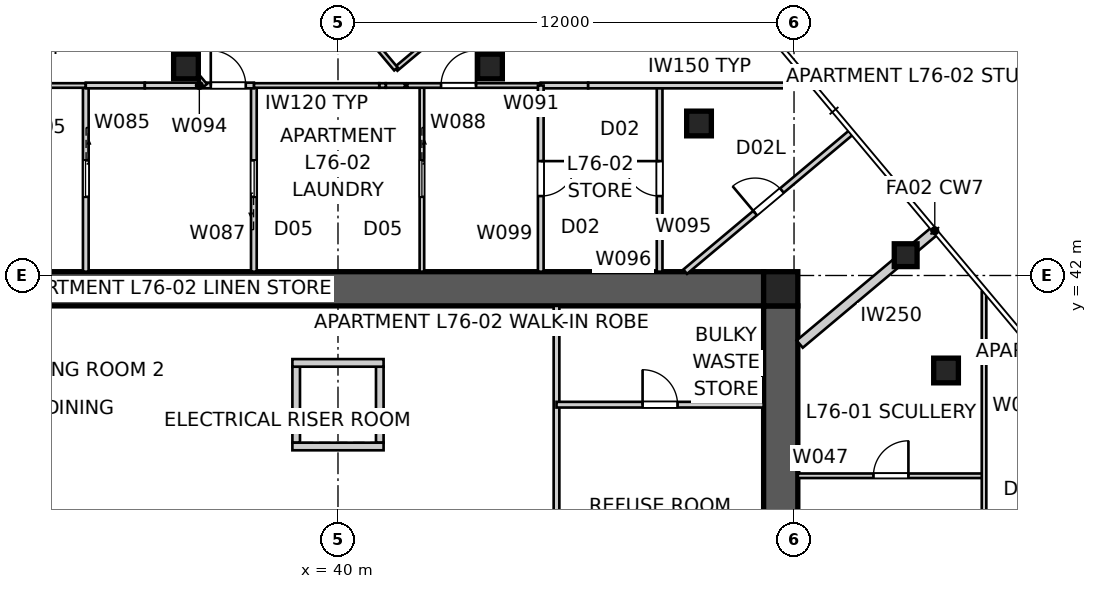
"""IFC4 building model, lengths in metres.
Left out: names, types, materials, properties, quantities, classifications, styles, units other than length and angle.
Written with IfcOpenShell. Run it as: python <this file> out.ifc"""

import sys

from ifc_helpers import new_model, si_unit, direction, frame, frame_2d, origin, origin_2d, place, context, subcontext, project, spatial, polyline, rectangle, outline, extrude, element, fill, save


model = new_model("IFC4")
c1 = context("Model", 3, precision=1e-05, world=origin(), true_north=direction((0.0, 1.0)))
c2 = subcontext(c1, "Body", "Model", "MODEL_VIEW")
j1 = project(units=[si_unit("LENGTHUNIT", "METRE"), si_unit("PLANEANGLEUNIT", "RADIAN")], contexts=[c1])
p1 = place(None, origin())
s1 = spatial("IfcSite", under=j1, at=p1, CompositionType="ELEMENT")
p2 = place(p1, origin())
s2 = spatial("IfcBuilding", under=s1, at=p2, CompositionType="ELEMENT")
p3 = place(p2, frame((0.0, 0.0, 276.0)))
s3 = spatial("IfcBuildingStorey", under=s2, at=p3, CompositionType="ELEMENT", Elevation=276.0)
p4 = place(p3, frame((28.8, 41.65, 0.0), z_axis=(0.0, 0.0, 1.0), x_axis=(1.0, 0.0, 0.0)))
e1 = element("IfcWall", 1, at=p4, inside=s3, PredefinedType="SHEAR", context=c2, shape_type="SweptSolid", body=[
    extrude(outline(polyline([(0.0, -0.45), (22.4, -0.45), (22.4, -0.025), (22.85, -0.025), (22.85, 0.025), (22.4, 0.025), (22.4, 0.45), (0.0, 0.45), (0.0, 0.025), (-0.45, 0.025), (-0.45, -0.025), (0.0, -0.025), (0.0, -0.45)])), origin(), (0.0, 0.0, 1.0), 3.4),
])
p5 = place(p3, frame((51.65, 18.8, 0.0), z_axis=(0.0, 0.0, 1.0), x_axis=(0.0, 1.0, 0.0)))
e2 = element("IfcWall", 2, at=p5, inside=s3, PredefinedType="SHEAR", context=c2, shape_type="SweptSolid", body=[
    extrude(outline(polyline([(0.0, -0.45), (22.4, -0.45), (22.4, -0.025), (22.85, -0.025), (22.85, 0.025), (22.4, 0.025), (22.4, 0.45), (0.0, 0.45), (0.0, 0.025), (-0.45, 0.025), (-0.45, -0.025), (0.0, -0.025), (0.0, -0.45)])), origin(), (0.0, 0.0, 1.0), 3.4),
])
p6 = place(p5, frame((11.14, 0.0, 0.0)))
e3 = element("IfcOpeningElement", 3, at=p6, cuts=e2, PredefinedType="OPENING", context=c2, shape_type="SweptSolid", body=[
    extrude(rectangle(XDim=1.02, YDim=2.4, at=frame_2d((0.51, 1.2))), frame((0.0, 0.46, 0.0), z_axis=(0.0, -1.0, 0.0), x_axis=(1.0, 0.0, 0.0)), (0.0, 0.0, 1.0), 0.92),
])
for number, where, z_axis, x_axis in (
    (4, (38.9, 37.6, 0.0), (0.0, 0.0, 1.0), (0.0, 1.0, 0.0)),
    (5, (41.1, 37.6, 0.0), (0.0, 0.0, 1.0), (0.0, 1.0, 0.0)),
):
    element("IfcWall", number, at=place(p3, frame(where, z_axis=z_axis, x_axis=x_axis)), inside=s3, PredefinedType="SOLIDWALL", context=c2, shape_type="SweptSolid", body=[
        extrude(rectangle(XDim=2.0, YDim=0.2, at=frame_2d((1.0, 0.0))), origin(), (0.0, 0.0, 1.0), 3.4),
    ])
for number, where, z_axis, x_axis in (
    (6, (38.8, 37.5, 0.0), (0.0, 0.0, 1.0), (1.0, 0.0, 0.0)),
    (7, (38.8, 39.7, 0.0), (0.0, 0.0, 1.0), (1.0, 0.0, 0.0)),
):
    element("IfcWall", number, at=place(p3, frame(where, z_axis=z_axis, x_axis=x_axis)), inside=s3, PredefinedType="SOLIDWALL", context=c2, shape_type="SweptSolid", body=[
        extrude(rectangle(XDim=2.4, YDim=0.2, at=frame_2d((1.2, 0.0))), origin(), (0.0, 0.0, 1.0), 3.4),
    ])
p7 = place(p3, frame((51.65, 41.65, 0.0), z_axis=(0.0, 0.0, 1.0), x_axis=(1.0, 0.0, 0.0)))
e8 = element("IfcColumn", 8, at=p7, inside=s3, PredefinedType="COLUMN", context=c2, shape_type="SweptSolid", body=[
    extrude(rectangle(XDim=0.9, YDim=0.9, at=origin_2d()), origin(), (0.0, 0.0, 1.0), 3.4),
])
p8 = place(p3, frame((54.938, 42.534, 0.0), z_axis=(0.0, 0.0, 1.0), x_axis=(1.0, 0.0, 0.0)))
e9 = element("IfcColumn", 9, at=p8, inside=s3, PredefinedType="COLUMN", context=c2, shape_type="SweptSolid", body=[
    extrude(rectangle(XDim=0.6, YDim=0.6, at=origin_2d()), origin(), (0.0, 0.0, 1.0), 3.4),
])
for number, where, z_axis, x_axis in (
    (10, (56.0, 39.5, 0.0), (0.0, 0.0, 1.0), (1.0, 0.0, 0.0)),
    (11, (49.5, 46.0, 0.0), (0.0, 0.0, 1.0), (1.0, 0.0, 0.0)),
    (12, (44.0, 47.5, 0.0), (0.0, 0.0, 1.0), (1.0, 0.0, 0.0)),
    (13, (36.0, 47.5, 0.0), (0.0, 0.0, 1.0), (1.0, 0.0, 0.0)),
):
    element("IfcColumn", number, at=place(p3, frame(where, z_axis=z_axis, x_axis=x_axis)), inside=s3, PredefinedType="COLUMN", context=c2, shape_type="SweptSolid", body=[
        extrude(rectangle(XDim=0.65, YDim=0.65, at=origin_2d()), origin(), (0.0, 0.0, 1.0), 3.4),
    ])
p9 = place(p3, frame((55.704, 43.177, 0.0), z_axis=(0.0, 0.0, 1.0), x_axis=(-0.76603440109, -0.64279957712, 0.0)))
e14 = element("IfcWall", 14, at=p9, inside=s3, PredefinedType="PARTITIONING", context=c2, shape_type="SweptSolid", body=[
    extrude(rectangle(XDim=4.64, YDim=0.25, at=frame_2d((2.32, 0.0))), origin(), (0.0, 0.0, 1.0), 3.25),
])
p10 = place(p3, frame((45.75, 41.2, 0.0), z_axis=(0.0, 0.0, 1.0), x_axis=(0.0, -1.0, 0.0)))
e15 = element("IfcWall", 15, at=p10, inside=s3, PredefinedType="SOLIDWALL", context=c2, shape_type="SweptSolid", body=[
    extrude(rectangle(XDim=5.9, YDim=0.15, at=frame_2d((2.95, 0.0))), origin(), (0.0, 0.0, 1.0), 3.25),
])
p11 = place(p3, frame((45.75, 38.6, 0.0), z_axis=(0.0, 0.0, 1.0), x_axis=(1.0, 0.0, 0.0)))
e16 = element("IfcWall", 16, at=p11, inside=s3, PredefinedType="SOLIDWALL", context=c2, shape_type="SweptSolid", body=[
    extrude(rectangle(XDim=5.45, YDim=0.15, at=frame_2d((2.725, 0.0))), origin(), (0.0, 0.0, 1.0), 3.25),
])
p12 = place(p11, frame((2.265, 0.0, 0.0)))
e17 = element("IfcOpeningElement", 17, at=p12, cuts=e16, PredefinedType="OPENING", context=c2, shape_type="SweptSolid", body=[
    extrude(rectangle(XDim=0.92, YDim=2.1, at=frame_2d((0.46, 1.05))), frame((0.0, 0.085, 0.0), z_axis=(0.0, -1.0, 0.0), x_axis=(1.0, 0.0, 0.0)), (0.0, 0.0, 1.0), 0.17),
])
p13 = place(p3, frame((52.1, 36.73, 0.0), z_axis=(0.0, 0.0, 1.0), x_axis=(1.0, 0.0, 0.0)))
e18 = element("IfcWall", 18, at=p13, inside=s3, PredefinedType="PARTITIONING", context=c2, shape_type="SweptSolid", body=[
    extrude(rectangle(XDim=4.9, YDim=0.12, at=frame_2d((2.45, 0.0))), origin(), (0.0, 0.0, 1.0), 3.25),
])
p14 = place(p13, frame((1.99, 0.0, 0.0)))
e19 = element("IfcOpeningElement", 19, at=p14, cuts=e18, PredefinedType="OPENING", context=c2, shape_type="SweptSolid", body=[
    extrude(rectangle(XDim=0.92, YDim=2.34, at=frame_2d((0.46, 1.17))), frame((0.0, 0.07, 0.0), z_axis=(0.0, -1.0, 0.0), x_axis=(1.0, 0.0, 0.0)), (0.0, 0.0, 1.0), 0.14),
])
p15 = place(p3, frame((57.0, 41.57, 0.0), z_axis=(0.0, 0.0, 1.0), x_axis=(0.0, -1.0, 0.0)))
e20 = element("IfcWall", 20, at=p15, inside=s3, PredefinedType="PARTITIONING", context=c2, shape_type="SweptSolid", body=[
    extrude(rectangle(XDim=12.656, YDim=0.12, at=frame_2d((6.328, 0.0))), origin(), (0.0, 0.0, 1.0), 2.549),
])
p16 = place(p15, frame((9.449, 0.0, 0.0)))
e21 = element("IfcOpeningElement", 21, at=p16, cuts=e20, PredefinedType="OPENING", context=c2, shape_type="SweptSolid", body=[
    extrude(rectangle(XDim=0.92, YDim=2.34, at=frame_2d((0.46, 1.17))), frame((0.0, 0.07, 0.0), z_axis=(0.0, -1.0, 0.0), x_axis=(1.0, 0.0, 0.0)), (0.0, 0.0, 1.0), 0.14),
])
p17 = place(p15, frame((6.031, 0.0, 0.0)))
e22 = element("IfcOpeningElement", 22, at=p17, cuts=e20, PredefinedType="OPENING", context=c2, shape_type="SweptSolid", body=[
    extrude(rectangle(XDim=0.92, YDim=2.34, at=frame_2d((0.46, 1.17))), frame((0.0, 0.07, 0.0), z_axis=(0.0, -1.0, 0.0), x_axis=(1.0, 0.0, 0.0)), (0.0, 0.0, 1.0), 0.14),
])
p18 = place(p3, frame((57.0, 33.495, 0.0), z_axis=(0.0, 0.0, 1.0), x_axis=(0.76605407051, 0.642776136034, 0.0)))
e23 = element("IfcWall", 23, at=p18, inside=s3, PredefinedType="PARTITIONING", context=c2, shape_type="SweptSolid", body=[
    extrude(rectangle(XDim=5.191, YDim=0.12, at=frame_2d((2.595, 0.0))), origin(), (0.0, 0.0, 1.0), 3.25),
])
p19 = place(p3, frame((33.364, 47.0, 0.0), z_axis=(0.0, 0.0, 1.0), x_axis=(0.0, -1.0, 0.0)))
e24 = element("IfcWall", 24, at=p19, inside=s3, PredefinedType="SOLIDWALL", context=c2, shape_type="SweptSolid", body=[
    extrude(rectangle(XDim=4.9, YDim=0.15, at=frame_2d((2.45, 0.0))), origin(), (0.0, 0.0, 1.0), 3.25),
])
p20 = place(p19, frame((1.97, 0.0, 0.0)))
e25 = element("IfcOpeningElement", 25, at=p20, cuts=e24, PredefinedType="OPENING", context=c2, shape_type="SweptSolid", body=[
    extrude(rectangle(XDim=0.96, YDim=2.1, at=frame_2d((0.48, 1.05))), frame((0.0, 0.085, 0.0), z_axis=(0.0, -1.0, 0.0), x_axis=(1.0, 0.0, 0.0)), (0.0, 0.0, 1.0), 0.17),
])
p21 = place(p3, frame((28.43, 47.0, 0.0), z_axis=(0.0, 0.0, 1.0), x_axis=(1.0, 0.0, 0.0)))
e26 = element("IfcWall", 26, at=p21, inside=s3, PredefinedType="PARTITIONING", context=c2, shape_type="SweptSolid", body=[
    extrude(rectangle(XDim=4.934, YDim=0.12, at=frame_2d((2.467, 0.0))), origin(), (0.0, 0.0, 1.0), 3.25),
])
p22 = place(p21, frame((2.553, 0.0, 0.0)))
e27 = element("IfcOpeningElement", 27, at=p22, cuts=e26, PredefinedType="OPENING", context=c2, shape_type="SweptSolid", body=[
    extrude(rectangle(XDim=0.96, YDim=2.1, at=frame_2d((0.48, 1.05))), frame((0.0, 0.07, 0.0), z_axis=(0.0, -1.0, 0.0), x_axis=(1.0, 0.0, 0.0)), (0.0, 0.0, 1.0), 0.14),
])
p23 = place(p3, frame((37.786, 42.1, 0.0), z_axis=(0.0, 0.0, 1.0), x_axis=(0.0, 1.0, 0.0)))
e28 = element("IfcWall", 28, at=p23, inside=s3, PredefinedType="SOLIDWALL", context=c2, shape_type="SweptSolid", body=[
    extrude(rectangle(XDim=4.9, YDim=0.15, at=frame_2d((2.45, 0.0))), origin(), (0.0, 0.0, 1.0), 3.25),
])
p24 = place(p23, frame((1.97, 0.0, 0.0)))
e29 = element("IfcOpeningElement", 29, at=p24, cuts=e28, PredefinedType="OPENING", context=c2, shape_type="SweptSolid", body=[
    extrude(rectangle(XDim=0.96, YDim=2.1, at=frame_2d((0.48, 1.05))), frame((0.0, 0.085, 0.0), z_axis=(0.0, -1.0, 0.0), x_axis=(1.0, 0.0, 0.0)), (0.0, 0.0, 1.0), 0.17),
])
p25 = place(p3, frame((42.208, 47.0, 0.0), z_axis=(0.0, 0.0, 1.0), x_axis=(0.0, -1.0, 0.0)))
e30 = element("IfcWall", 30, at=p25, inside=s3, PredefinedType="PARTITIONING", context=c2, shape_type="SweptSolid", body=[
    extrude(rectangle(XDim=4.9, YDim=0.12, at=frame_2d((2.45, 0.0))), origin(), (0.0, 0.0, 1.0), 3.25),
])
p26 = place(p25, frame((1.97, 0.0, 0.0)))
e31 = element("IfcOpeningElement", 31, at=p26, cuts=e30, PredefinedType="OPENING", context=c2, shape_type="SweptSolid", body=[
    extrude(rectangle(XDim=0.96, YDim=2.1, at=frame_2d((0.48, 1.05))), frame((0.0, 0.07, 0.0), z_axis=(0.0, -1.0, 0.0), x_axis=(1.0, 0.0, 0.0)), (0.0, 0.0, 1.0), 0.14),
])
p27 = place(p3, frame((41.258, 47.0, 0.0), z_axis=(0.0, 0.0, 1.0), x_axis=(1.0, 0.0, 0.0)))
e32 = element("IfcWall", 32, at=p27, inside=s3, PredefinedType="PARTITIONING", context=c2, shape_type="SweptSolid", body=[
    extrude(rectangle(XDim=0.504, YDim=0.12, at=frame_2d((0.252, 0.0))), origin(), (0.0, 0.0, 1.0), 3.25),
])
p28 = place(p3, frame((41.824, 47.0, 0.0), z_axis=(0.0, 0.0, 1.0), x_axis=(1.0, 0.0, 0.0)))
e33 = element("IfcWall", 33, at=p28, inside=s3, PredefinedType="PARTITIONING", context=c2, shape_type="SweptSolid", body=[
    extrude(rectangle(XDim=3.511, YDim=0.12, at=frame_2d((1.756, 0.0))), origin(), (0.0, 0.0, 1.0), 3.25),
])
p29 = place(p28, frame((0.887, 0.0, 0.0)))
e34 = element("IfcOpeningElement", 34, at=p29, cuts=e33, PredefinedType="OPENING", context=c2, shape_type="SweptSolid", body=[
    extrude(rectangle(XDim=0.92, YDim=2.34, at=frame_2d((0.46, 1.17))), frame((0.0, 0.07, 0.0), z_axis=(0.0, -1.0, 0.0), x_axis=(1.0, 0.0, 0.0)), (0.0, 0.0, 1.0), 0.14),
])
p30 = place(p3, frame((37.786, 47.0, 0.0), z_axis=(0.0, 0.0, 1.0), x_axis=(1.0, 0.0, 0.0)))
e35 = element("IfcWall", 35, at=p30, inside=s3, PredefinedType="PARTITIONING", context=c2, shape_type="SweptSolid", body=[
    extrude(rectangle(XDim=3.299, YDim=0.12, at=frame_2d((1.65, 0.0))), origin(), (0.0, 0.0, 1.0), 3.25),
])
p31 = place(p3, frame((33.364, 47.0, 0.0), z_axis=(0.0, 0.0, 1.0), x_axis=(1.0, 0.0, 0.0)))
e36 = element("IfcWall", 36, at=p31, inside=s3, PredefinedType="SOLIDWALL", context=c2, shape_type="SweptSolid", body=[
    extrude(rectangle(XDim=1.553, YDim=0.15, at=frame_2d((0.776, 0.0))), origin(), (0.0, 0.0, 1.0), 2.549),
])
p32 = place(p3, frame((34.917, 47.0, 0.0), z_axis=(0.0, 0.0, 1.0), x_axis=(1.0, 0.0, 0.0)))
e37 = element("IfcWall", 37, at=p32, inside=s3, PredefinedType="SOLIDWALL", context=c2, shape_type="SweptSolid", body=[
    extrude(rectangle(XDim=2.869, YDim=0.15, at=frame_2d((1.435, 0.0))), origin(), (0.0, 0.0, 1.0), 3.25),
])
p33 = place(p32, frame((1.736, 0.0, 0.0)))
e38 = element("IfcOpeningElement", 38, at=p33, cuts=e37, PredefinedType="OPENING", context=c2, shape_type="SweptSolid", body=[
    extrude(rectangle(XDim=0.92, YDim=2.34, at=frame_2d((0.46, 1.17))), frame((0.0, 0.085, 0.0), z_axis=(0.0, -1.0, 0.0), x_axis=(1.0, 0.0, 0.0)), (0.0, 0.0, 1.0), 0.17),
])
p34 = place(p3, frame((49.136, 42.1, 0.0), z_axis=(0.0, 0.0, 1.0), x_axis=(0.766055078255, 0.642774935012, 0.0)))
e39 = element("IfcWall", 39, at=p34, inside=s3, PredefinedType="SOLIDWALL", context=c2, shape_type="SweptSolid", body=[
    extrude(rectangle(XDim=5.684, YDim=0.15, at=frame_2d((2.842, 0.0))), origin(), (0.0, 0.0, 1.0), 3.25),
])
p35 = place(p34, frame((2.402, 0.0, 0.0)))
e40 = element("IfcOpeningElement", 40, at=p35, cuts=e39, PredefinedType="OPENING", context=c2, shape_type="SweptSolid", body=[
    extrude(rectangle(XDim=0.92, YDim=2.1, at=frame_2d((0.46, 1.05))), frame((0.0, 0.085, 0.0), z_axis=(0.0, -1.0, 0.0), x_axis=(1.0, 0.0, 0.0)), (0.0, 0.0, 1.0), 0.17),
])
p36 = place(p3, frame((48.463, 42.1, 0.0), z_axis=(0.0, 0.0, 1.0), x_axis=(0.0, 1.0, 0.0)))
e41 = element("IfcWall", 41, at=p36, inside=s3, PredefinedType="SOLIDWALL", context=c2, shape_type="SweptSolid", body=[
    extrude(rectangle(XDim=4.9, YDim=0.15, at=frame_2d((2.45, 0.0))), origin(), (0.0, 0.0, 1.0), 3.25),
])
p37 = place(p36, frame((1.99, 0.0, 0.0)))
e42 = element("IfcOpeningElement", 42, at=p37, cuts=e41, PredefinedType="OPENING", context=c2, shape_type="SweptSolid", body=[
    extrude(rectangle(XDim=0.92, YDim=2.34, at=frame_2d((0.46, 1.17))), frame((0.0, 0.085, 0.0), z_axis=(0.0, -1.0, 0.0), x_axis=(1.0, 0.0, 0.0)), (0.0, 0.0, 1.0), 0.17),
])
p38 = place(p3, frame((45.336, 47.0, 0.0), z_axis=(0.0, 0.0, 1.0), x_axis=(1.0, 0.0, 0.0)))
e43 = element("IfcWall", 43, at=p38, inside=s3, PredefinedType="SOLIDWALL", context=c2, shape_type="SweptSolid", body=[
    extrude(rectangle(XDim=1.248, YDim=0.15, at=frame_2d((0.624, 0.0))), origin(), (0.0, 0.0, 1.0), 2.549),
])
p39 = place(p3, frame((46.583, 47.0, 0.0), z_axis=(0.0, 0.0, 1.0), x_axis=(1.0, 0.0, 0.0)))
e44 = element("IfcWall", 44, at=p39, inside=s3, PredefinedType="SOLIDWALL", context=c2, shape_type="SweptSolid", body=[
    extrude(rectangle(XDim=5.86, YDim=0.15, at=frame_2d((2.93, 0.0))), origin(), (0.0, 0.0, 1.0), 3.25),
])
p40 = place(p3, frame((45.336, 47.0, 0.0), z_axis=(0.0, 0.0, 1.0), x_axis=(0.0, -1.0, 0.0)))
e45 = element("IfcWall", 45, at=p40, inside=s3, PredefinedType="SOLIDWALL", context=c2, shape_type="SweptSolid", body=[
    extrude(rectangle(XDim=4.9, YDim=0.15, at=frame_2d((2.45, 0.0))), origin(), (0.0, 0.0, 1.0), 3.25),
])
p41 = place(p40, frame((1.99, 0.0, 0.0)))
e46 = element("IfcOpeningElement", 46, at=p41, cuts=e45, PredefinedType="OPENING", context=c2, shape_type="SweptSolid", body=[
    extrude(rectangle(XDim=0.92, YDim=2.34, at=frame_2d((0.46, 1.17))), frame((0.0, 0.085, 0.0), z_axis=(0.0, -1.0, 0.0), x_axis=(1.0, 0.0, 0.0)), (0.0, 0.0, 1.0), 0.17),
])
p42 = place(p3, frame((47.719, 52.631, 0.0), z_axis=(0.0, 0.0, 1.0), x_axis=(-0.766033729027, -0.642800378028, 0.0)))
e47 = element("IfcWall", 47, at=p42, inside=s3, PredefinedType="PARTITIONING", context=c2, shape_type="SweptSolid", body=[
    extrude(rectangle(XDim=8.085, YDim=0.12, at=frame_2d((4.042, 0.0))), origin(), (0.0, 0.0, 1.0), 3.25),
])
p43 = place(p3, frame((41.525, 47.434, 0.0), z_axis=(0.0, 0.0, 1.0), x_axis=(-0.642800378028, 0.766033729027, 0.0)))
e48 = element("IfcWall", 48, at=p43, inside=s3, PredefinedType="PARTITIONING", context=c2, shape_type="SweptSolid", body=[
    extrude(rectangle(XDim=8.085, YDim=0.12, at=frame_2d((4.042, 0.0))), origin(), (0.0, 0.0, 1.0), 3.25),
])
p44 = place(p43, frame((3.603, 0.0, 0.0)))
e49 = element("IfcOpeningElement", 49, at=p44, cuts=e48, PredefinedType="OPENING", context=c2, shape_type="SweptSolid", body=[
    extrude(rectangle(XDim=0.92, YDim=2.34, at=frame_2d((0.46, 1.17))), frame((0.0, 0.07, 0.0), z_axis=(0.0, -1.0, 0.0), x_axis=(1.0, 0.0, 0.0)), (0.0, 0.0, 1.0), 0.14),
])
p45 = place(p3, frame((36.505, 47.0, 0.0), z_axis=(0.0, 0.0, 1.0), x_axis=(-0.642776136034, 0.76605407051, 0.0)))
e50 = element("IfcWall", 50, at=p45, inside=s3, PredefinedType="PARTITIONING", context=c2, shape_type="SweptSolid", body=[
    extrude(rectangle(XDim=5.191, YDim=0.12, at=frame_2d((2.595, 0.0))), origin(), (0.0, 0.0, 1.0), 3.25),
])
p46 = place(p3, frame((41.258, 47.0, 0.0), z_axis=(0.0, 0.0, 1.0), x_axis=(-1.0, 0.0, 0.0)))
e51 = element("IfcWall", 51, at=p46, inside=s3, PredefinedType="PARTITIONING", context=c2, shape_type="SweptSolid", body=[
    extrude(rectangle(XDim=0.172, YDim=0.12, at=frame_2d((0.086, 0.0))), origin(), (0.0, 0.0, 1.0), 3.25),
])
p47 = place(p12, origin())
e52 = element("IfcDoor", 52, at=p47, inside=s3, OperationType="SINGLE_SWING_LEFT", PredefinedType="DOOR", context=c2, shape_type="SweptSolid", body=[
    extrude(rectangle(XDim=0.92, YDim=2.1, at=frame_2d((0.46, 1.05))), frame((0.0, 0.025, 0.0), z_axis=(0.0, -1.0, 0.0), x_axis=(1.0, 0.0, 0.0)), (0.0, 0.0, 1.0), 0.05),
])
fill(e17, e52)
p48 = place(p14, origin())
e53 = element("IfcDoor", 53, at=p48, inside=s3, OperationType="SINGLE_SWING_RIGHT", PredefinedType="DOOR", context=c2, shape_type="SweptSolid", body=[
    extrude(rectangle(XDim=0.92, YDim=2.34, at=frame_2d((0.46, 1.17))), frame((0.0, 0.025, 0.0), z_axis=(0.0, -1.0, 0.0), x_axis=(1.0, 0.0, 0.0)), (0.0, 0.0, 1.0), 0.05),
])
fill(e19, e53)
p49 = place(p20, origin())
e54 = element("IfcDoor", 54, at=p49, inside=s3, OperationType="SLIDING_TO_LEFT", PredefinedType="DOOR", context=c2, shape_type="SweptSolid", body=[
    extrude(rectangle(XDim=0.96, YDim=2.1, at=frame_2d((0.48, 1.05))), frame((0.0, 0.025, 0.0), z_axis=(0.0, -1.0, 0.0), x_axis=(1.0, 0.0, 0.0)), (0.0, 0.0, 1.0), 0.05),
])
fill(e25, e54)
p50 = place(p24, origin())
e55 = element("IfcDoor", 55, at=p50, inside=s3, OperationType="SLIDING_TO_LEFT", PredefinedType="DOOR", context=c2, shape_type="SweptSolid", body=[
    extrude(rectangle(XDim=0.96, YDim=2.1, at=frame_2d((0.48, 1.05))), frame((0.0, 0.025, 0.0), z_axis=(0.0, -1.0, 0.0), x_axis=(1.0, 0.0, 0.0)), (0.0, 0.0, 1.0), 0.05),
])
fill(e29, e55)
p51 = place(p33, origin())
e56 = element("IfcDoor", 56, at=p51, inside=s3, OperationType="SINGLE_SWING_LEFT", PredefinedType="DOOR", context=c2, shape_type="SweptSolid", body=[
    extrude(rectangle(XDim=0.92, YDim=2.34, at=frame_2d((0.46, 1.17))), frame((0.0, 0.025, 0.0), z_axis=(0.0, -1.0, 0.0), x_axis=(1.0, 0.0, 0.0)), (0.0, 0.0, 1.0), 0.05),
])
fill(e38, e56)
p52 = place(p26, origin())
e57 = element("IfcDoor", 57, at=p52, inside=s3, OperationType="SLIDING_TO_LEFT", PredefinedType="DOOR", context=c2, shape_type="SweptSolid", body=[
    extrude(rectangle(XDim=0.96, YDim=2.1, at=frame_2d((0.48, 1.05))), frame((0.0, 0.025, 0.0), z_axis=(0.0, -1.0, 0.0), x_axis=(1.0, 0.0, 0.0)), (0.0, 0.0, 1.0), 0.05),
])
fill(e31, e57)
p53 = place(p41, origin())
e58 = element("IfcDoor", 58, at=p53, inside=s3, OperationType="SINGLE_SWING_LEFT", PredefinedType="DOOR", context=c2, shape_type="SweptSolid", body=[
    extrude(rectangle(XDim=0.92, YDim=2.34, at=frame_2d((0.46, 1.17))), frame((0.0, 0.025, 0.0), z_axis=(0.0, -1.0, 0.0), x_axis=(1.0, 0.0, 0.0)), (0.0, 0.0, 1.0), 0.05),
])
fill(e46, e58)
p54 = place(p29, origin())
e59 = element("IfcDoor", 59, at=p54, inside=s3, OperationType="SINGLE_SWING_RIGHT", PredefinedType="DOOR", context=c2, shape_type="SweptSolid", body=[
    extrude(rectangle(XDim=0.92, YDim=2.34, at=frame_2d((0.46, 1.17))), frame((0.0, 0.025, 0.0), z_axis=(0.0, -1.0, 0.0), x_axis=(1.0, 0.0, 0.0)), (0.0, 0.0, 1.0), 0.05),
])
fill(e34, e59)
p55 = place(p37, origin())
e60 = element("IfcDoor", 60, at=p55, inside=s3, OperationType="SINGLE_SWING_RIGHT", PredefinedType="DOOR", context=c2, shape_type="SweptSolid", body=[
    extrude(rectangle(XDim=0.92, YDim=2.34, at=frame_2d((0.46, 1.17))), frame((0.0, 0.025, 0.0), z_axis=(0.0, -1.0, 0.0), x_axis=(1.0, 0.0, 0.0)), (0.0, 0.0, 1.0), 0.05),
])
fill(e42, e60)
p56 = place(p35, origin())
e61 = element("IfcDoor", 61, at=p56, inside=s3, OperationType="SINGLE_SWING_LEFT", PredefinedType="DOOR", context=c2, shape_type="SweptSolid", body=[
    extrude(rectangle(XDim=0.92, YDim=2.1, at=frame_2d((0.46, 1.05))), frame((0.0, 0.025, 0.0), z_axis=(0.0, -1.0, 0.0), x_axis=(1.0, 0.0, 0.0)), (0.0, 0.0, 1.0), 0.05),
])
fill(e40, e61)
save(model, sys.argv[1])
